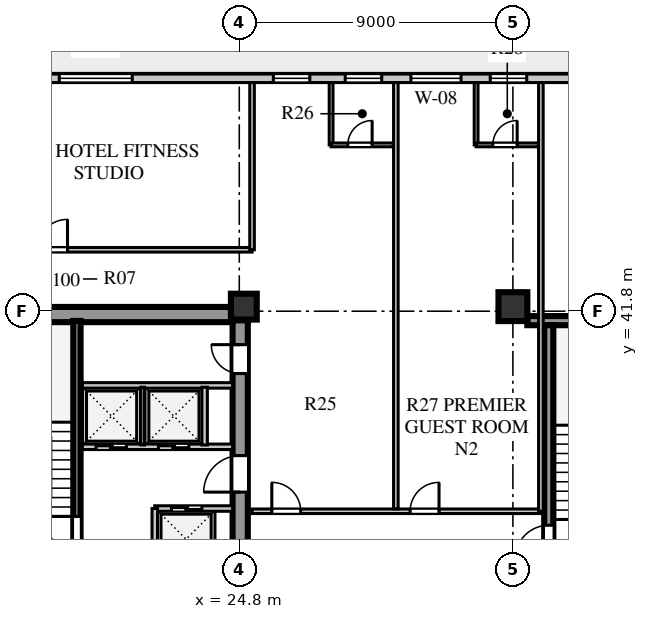
"""IFC4 building model, lengths in metres.
Left out: names, types, materials, properties, quantities, classifications, styles, units other than length and angle.
Written with IfcOpenShell. Run it as: python <this file> out.ifc"""

import sys

from ifc_helpers import new_model, si_unit, direction, frame, frame_2d, origin, origin_2d, place, context, subcontext, project, spatial, rectangle, extrude, element, fill, save


model = new_model("IFC4")
c1 = context("Model", 3, precision=1e-05, world=origin(), true_north=direction((0.0, 1.0)))
c2 = subcontext(c1, "Body", "Model", "MODEL_VIEW")
j1 = project(units=[si_unit("LENGTHUNIT", "METRE"), si_unit("PLANEANGLEUNIT", "RADIAN")], contexts=[c1])
p1 = place(None, origin())
s1 = spatial("IfcSite", under=j1, at=p1, CompositionType="ELEMENT")
p2 = place(p1, origin())
s2 = spatial("IfcBuilding", under=s1, at=p2, CompositionType="ELEMENT")
p3 = place(p2, frame((0.0, 0.0, 196.4)))
s3 = spatial("IfcBuildingStorey", under=s2, at=p3, CompositionType="ELEMENT", Elevation=196.4)
p4 = place(p3, frame((15.4, 41.69, 0.0), z_axis=(0.0, 0.0, 1.0), x_axis=(1.0, 0.0, 0.0)))
e1 = element("IfcWall", 1, at=p4, inside=s3, PredefinedType="SHEAR", context=c2, shape_type="SweptSolid", body=[
    extrude(rectangle(XDim=9.68, YDim=0.5, at=frame_2d((4.84, 0.0))), origin(), (0.0, 0.0, 1.0), 3.6),
])
p5 = place(p3, frame((24.83, 15.74, 0.0), z_axis=(0.0, 0.0, 1.0), x_axis=(0.0, 1.0, 0.0)))
e2 = element("IfcWall", 2, at=p5, inside=s3, PredefinedType="SHEAR", context=c2, shape_type="SweptSolid", body=[
    extrude(rectangle(XDim=25.76, YDim=0.5, at=frame_2d((12.88, 0.0))), origin(), (0.0, 0.0, 1.0), 3.6),
])
p6 = place(p5, frame((1.61, 0.0, 0.0)))
e3 = element("IfcOpeningElement", 3, at=p6, cuts=e2, PredefinedType="OPENING", context=c2, shape_type="SweptSolid", body=[
    extrude(rectangle(XDim=1.2, YDim=2.1, at=frame_2d((0.6, 1.05))), frame((0.0, 0.26, 0.0), z_axis=(0.0, -1.0, 0.0), x_axis=(1.0, 0.0, 0.0)), (0.0, 0.0, 1.0), 0.52),
])
p7 = place(p5, frame((6.78, 0.0, 0.0)))
e4 = element("IfcOpeningElement", 4, at=p7, cuts=e2, PredefinedType="OPENING", context=c2, shape_type="SweptSolid", body=[
    extrude(rectangle(XDim=0.85, YDim=2.06, at=frame_2d((0.425, 1.03))), frame((0.0, 0.26, 0.0), z_axis=(0.0, -1.0, 0.0), x_axis=(1.0, 0.0, 0.0)), (0.0, 0.0, 1.0), 0.52),
])
p8 = place(p5, frame((12.11, 0.0, 0.0)))
e5 = element("IfcOpeningElement", 5, at=p8, cuts=e2, PredefinedType="OPENING", context=c2, shape_type="SweptSolid", body=[
    extrude(rectangle(XDim=1.5, YDim=2.12, at=frame_2d((0.75, 1.06))), frame((0.0, 0.26, 0.0), z_axis=(0.0, -1.0, 0.0), x_axis=(1.0, 0.0, 0.0)), (0.0, 0.0, 1.0), 0.52),
])
p9 = place(p5, frame((20.11, 0.0, 0.0)))
e6 = element("IfcOpeningElement", 6, at=p9, cuts=e2, PredefinedType="OPENING", context=c2, shape_type="SweptSolid", body=[
    extrude(rectangle(XDim=1.2, YDim=2.12, at=frame_2d((0.6, 1.06))), frame((0.0, 0.26, 0.0), z_axis=(0.0, -1.0, 0.0), x_axis=(1.0, 0.0, 0.0)), (0.0, 0.0, 1.0), 0.52),
])
p10 = place(p5, frame((24.01, 0.0, 0.0)))
e7 = element("IfcOpeningElement", 7, at=p10, cuts=e2, PredefinedType="OPENING", context=c2, shape_type="SweptSolid", body=[
    extrude(rectangle(XDim=0.95, YDim=2.1, at=frame_2d((0.475, 1.05))), frame((0.0, 0.26, 0.0), z_axis=(0.0, -1.0, 0.0), x_axis=(1.0, 0.0, 0.0)), (0.0, 0.0, 1.0), 0.52),
])
p11 = place(p3, frame((34.275, 41.49, 0.0), z_axis=(0.0, 0.0, 1.0), x_axis=(1.0, 0.0, 0.0)))
e8 = element("IfcWall", 8, at=p11, inside=s3, PredefinedType="SHEAR", context=c2, shape_type="SweptSolid", body=[
    extrude(rectangle(XDim=4.595, YDim=0.3, at=frame_2d((2.298, 0.0))), origin(), (0.0, 0.0, 1.0), 3.6),
])
p12 = place(p3, frame((34.98, 33.31, 0.0), z_axis=(0.0, 0.0, 1.0), x_axis=(0.0, 1.0, 0.0)))
e9 = element("IfcWall", 9, at=p12, inside=s3, PredefinedType="SHEAR", context=c2, shape_type="SweptSolid", body=[
    extrude(rectangle(XDim=8.03, YDim=0.3, at=frame_2d((4.015, 0.0))), origin(), (0.0, 0.0, 1.0), 3.6),
])
p13 = place(p12, frame((0.35, 0.0, 0.0)))
e10 = element("IfcOpeningElement", 10, at=p13, cuts=e9, PredefinedType="OPENING", context=c2, shape_type="SweptSolid", body=[
    extrude(rectangle(XDim=1.1, YDim=2.1, at=frame_2d((0.55, 1.05))), frame((0.0, 0.16, 0.0), z_axis=(0.0, -1.0, 0.0), x_axis=(1.0, 0.0, 0.0)), (0.0, 0.0, 1.0), 0.32),
])
p14 = place(p3, frame((24.95, 41.95, 0.0), z_axis=(0.0, 0.0, 1.0), x_axis=(1.0, 0.0, 0.0)))
e11 = element("IfcColumn", 11, at=p14, inside=s3, PredefinedType="COLUMN", context=c2, shape_type="SweptSolid", body=[
    extrude(rectangle(XDim=0.85, YDim=0.85, at=origin_2d()), origin(), (0.0, 0.0, 1.0), 3.6),
])
p15 = place(p3, frame((33.8, 41.95, 0.0), z_axis=(0.0, 0.0, 1.0), x_axis=(1.0, 0.0, 0.0)))
e12 = element("IfcColumn", 12, at=p15, inside=s3, PredefinedType="COLUMN", context=c2, shape_type="SweptSolid", body=[
    extrude(rectangle(XDim=0.95, YDim=0.95, at=origin_2d()), origin(), (0.0, 0.0, 1.0), 3.6),
])
p16 = place(p3, frame((45.55, 49.46, 0.0), z_axis=(0.0, 0.0, 1.0), x_axis=(-1.0, 0.0, 0.0)))
e13 = element("IfcWall", 13, at=p16, inside=s3, PredefinedType="STANDARD", context=c2, shape_type="SweptSolid", body=[
    extrude(rectangle(XDim=32.5, YDim=0.28, at=frame_2d((16.25, 0.0))), origin(), (0.0, 0.0, 1.0), 3.6),
])
p17 = place(p16, frame((30.55, 0.0, 0.0)))
e14 = element("IfcOpeningElement", 14, at=p17, cuts=e13, PredefinedType="OPENING", context=c2, shape_type="SweptSolid", body=[
    extrude(rectangle(XDim=1.0, YDim=2.05, at=frame_2d((0.5, 1.025))), frame((0.0, 0.15, 0.0), z_axis=(0.0, -1.0, 0.0), x_axis=(1.0, 0.0, 0.0)), (0.0, 0.0, 1.0), 0.3),
])
p18 = place(p16, frame((24.27, 0.0, 0.8)))
e15 = element("IfcOpeningElement", 15, at=p18, cuts=e13, PredefinedType="OPENING", context=c2, shape_type="SweptSolid", body=[
    extrude(rectangle(XDim=2.4, YDim=2.05, at=frame_2d((1.2, 1.025))), frame((0.0, 0.15, 0.0), z_axis=(0.0, -1.0, 0.0), x_axis=(1.0, 0.0, 0.0)), (0.0, 0.0, 1.0), 0.3),
])
p19 = place(p16, frame((18.43, 0.0, 0.8)))
e16 = element("IfcOpeningElement", 16, at=p19, cuts=e13, PredefinedType="OPENING", context=c2, shape_type="SweptSolid", body=[
    extrude(rectangle(XDim=1.2, YDim=1.75, at=frame_2d((0.6, 0.875))), frame((0.0, 0.15, 0.0), z_axis=(0.0, -1.0, 0.0), x_axis=(1.0, 0.0, 0.0)), (0.0, 0.0, 1.0), 0.3),
])
p20 = place(p16, frame((16.065, 0.0, 0.8)))
e17 = element("IfcOpeningElement", 17, at=p20, cuts=e13, PredefinedType="OPENING", context=c2, shape_type="SweptSolid", body=[
    extrude(rectangle(XDim=1.2, YDim=1.75, at=frame_2d((0.6, 0.875))), frame((0.0, 0.15, 0.0), z_axis=(0.0, -1.0, 0.0), x_axis=(1.0, 0.0, 0.0)), (0.0, 0.0, 1.0), 0.3),
])
p21 = place(p16, frame((13.455, 0.0, 0.8)))
e18 = element("IfcOpeningElement", 18, at=p21, cuts=e13, PredefinedType="OPENING", context=c2, shape_type="SweptSolid", body=[
    extrude(rectangle(XDim=1.65, YDim=1.95, at=frame_2d((0.825, 0.975))), frame((0.0, 0.15, 0.0), z_axis=(0.0, -1.0, 0.0), x_axis=(1.0, 0.0, 0.0)), (0.0, 0.0, 1.0), 0.3),
])
p22 = place(p16, frame((11.295, 0.0, 0.8)))
e19 = element("IfcOpeningElement", 19, at=p22, cuts=e13, PredefinedType="OPENING", context=c2, shape_type="SweptSolid", body=[
    extrude(rectangle(XDim=1.2, YDim=1.75, at=frame_2d((0.6, 0.875))), frame((0.0, 0.15, 0.0), z_axis=(0.0, -1.0, 0.0), x_axis=(1.0, 0.0, 0.0)), (0.0, 0.0, 1.0), 0.3),
])
p23 = place(p16, frame((6.655, 0.0, 0.8)))
e20 = element("IfcOpeningElement", 20, at=p23, cuts=e13, PredefinedType="OPENING", context=c2, shape_type="SweptSolid", body=[
    extrude(rectangle(XDim=2.25, YDim=2.0, at=frame_2d((1.125, 1.0))), frame((0.0, 0.15, 0.0), z_axis=(0.0, -1.0, 0.0), x_axis=(1.0, 0.0, 0.0)), (0.0, 0.0, 1.0), 0.3),
])
p24 = place(p16, frame((1.52, 0.0, 0.8)))
e21 = element("IfcOpeningElement", 21, at=p24, cuts=e13, PredefinedType="OPENING", context=c2, shape_type="SweptSolid", body=[
    extrude(rectangle(XDim=1.8, YDim=2.0, at=frame_2d((0.9, 1.0))), frame((0.0, 0.15, 0.0), z_axis=(0.0, -1.0, 0.0), x_axis=(1.0, 0.0, 0.0)), (0.0, 0.0, 1.0), 0.3),
])
p25 = place(p3, frame((19.46, 33.3, 0.0), z_axis=(0.0, 0.0, 1.0), x_axis=(0.0, 1.0, 0.0)))
e22 = element("IfcWall", 22, at=p25, inside=s3, PredefinedType="SHEAR", context=c2, shape_type="SweptSolid", body=[
    extrude(rectangle(XDim=8.18, YDim=0.24, at=frame_2d((4.09, 0.0))), origin(), (0.0, 0.0, 1.0), 3.85),
])
p26 = place(p25, frame((0.65, 0.0, 0.0)))
e23 = element("IfcOpeningElement", 23, at=p26, cuts=e22, PredefinedType="OPENING", context=c2, shape_type="SweptSolid", body=[
    extrude(rectangle(XDim=1.1, YDim=2.1, at=frame_2d((0.55, 1.05))), frame((0.0, 0.13, 0.0), z_axis=(0.0, -1.0, 0.0), x_axis=(1.0, 0.0, 0.0)), (0.0, 0.0, 1.0), 0.26),
])
p27 = place(p3, frame((22.02, 35.31, 0.0), z_axis=(0.0, 0.0, 1.0), x_axis=(1.0, 0.0, 0.0)))
e24 = element("IfcWall", 24, at=p27, inside=s3, PredefinedType="SOLIDWALL", context=c2, shape_type="SweptSolid", body=[
    extrude(rectangle(XDim=2.56, YDim=0.18, at=frame_2d((1.28, 0.0))), origin(), (0.0, 0.0, 1.0), 3.6),
])
p28 = place(p27, frame((0.55, 0.0, 0.0)))
e25 = element("IfcOpeningElement", 25, at=p28, cuts=e24, PredefinedType="OPENING", context=c2, shape_type="SweptSolid", body=[
    extrude(rectangle(XDim=1.0, YDim=2.1, at=frame_2d((0.5, 1.05))), frame((0.0, 0.1, 0.0), z_axis=(0.0, -1.0, 0.0), x_axis=(1.0, 0.0, 0.0)), (0.0, 0.0, 1.0), 0.2),
])
p29 = place(p3, frame((22.02, 33.3, 0.0), z_axis=(0.0, 0.0, 1.0), x_axis=(0.0, 1.0, 0.0)))
e26 = element("IfcWall", 26, at=p29, inside=s3, PredefinedType="SOLIDWALL", context=c2, shape_type="SweptSolid", body=[
    extrude(rectangle(XDim=2.01, YDim=0.18, at=frame_2d((1.005, 0.0))), origin(), (0.0, 0.0, 1.0), 3.6),
])
p30 = place(p3, frame((19.64, 37.34, 0.0), z_axis=(0.0, 0.0, 1.0), x_axis=(1.0, 0.0, 0.0)))
e27 = element("IfcWall", 27, at=p30, inside=s3, PredefinedType="SOLIDWALL", context=c2, shape_type="SweptSolid", body=[
    extrude(rectangle(XDim=4.94, YDim=0.18, at=frame_2d((2.47, 0.0))), origin(), (0.0, 0.0, 1.0), 3.6),
])
p31 = place(p30, frame((0.45, 0.0, 0.0)))
e28 = element("IfcOpeningElement", 28, at=p31, cuts=e27, PredefinedType="OPENING", context=c2, shape_type="SweptSolid", body=[
    extrude(rectangle(XDim=1.0, YDim=2.1, at=frame_2d((0.5, 1.05))), frame((0.0, 0.1, 0.0), z_axis=(0.0, -1.0, 0.0), x_axis=(1.0, 0.0, 0.0)), (0.0, 0.0, 1.0), 0.2),
])
p32 = place(p30, frame((2.5, 0.0, 0.0)))
e29 = element("IfcOpeningElement", 29, at=p32, cuts=e27, PredefinedType="OPENING", context=c2, shape_type="SweptSolid", body=[
    extrude(rectangle(XDim=1.0, YDim=2.1, at=frame_2d((0.5, 1.05))), frame((0.0, 0.1, 0.0), z_axis=(0.0, -1.0, 0.0), x_axis=(1.0, 0.0, 0.0)), (0.0, 0.0, 1.0), 0.2),
])
p33 = place(p3, frame((19.64, 39.36, 0.0), z_axis=(0.0, 0.0, 1.0), x_axis=(1.0, 0.0, 0.0)))
e30 = element("IfcWall", 30, at=p33, inside=s3, PredefinedType="SOLIDWALL", context=c2, shape_type="SweptSolid", body=[
    extrude(rectangle(XDim=4.94, YDim=0.18, at=frame_2d((2.47, 0.0))), origin(), (0.0, 0.0, 1.0), 3.6),
])
p34 = place(p3, frame((21.62, 37.4, 0.0), z_axis=(0.0, 0.0, 1.0), x_axis=(0.0, 1.0, 0.0)))
e31 = element("IfcWall", 31, at=p34, inside=s3, PredefinedType="PARTITIONING", context=c2, shape_type="SweptSolid", body=[
    extrude(rectangle(XDim=1.9, YDim=0.12, at=frame_2d((0.95, 0.0))), origin(), (0.0, 0.0, 1.0), 3.6),
])
p35 = place(p3, frame((23.66, 37.4, 0.0), z_axis=(0.0, 0.0, 1.0), x_axis=(0.0, 1.0, 0.0)))
e32 = element("IfcWall", 32, at=p35, inside=s3, PredefinedType="SOLIDWALL", context=c2, shape_type="SweptSolid", body=[
    extrude(rectangle(XDim=1.9, YDim=0.18, at=frame_2d((0.95, 0.0))), origin(), (0.0, 0.0, 1.0), 3.6),
])
p36 = place(p3, frame((25.22, 35.22, 0.0), z_axis=(0.0, 0.0, 1.0), x_axis=(1.0, 0.0, 0.0)))
e33 = element("IfcWall", 33, at=p36, inside=s3, PredefinedType="PARTITIONING", context=c2, shape_type="SweptSolid", body=[
    extrude(rectangle(XDim=9.5, YDim=0.15, at=frame_2d((4.75, 0.0))), origin(), (0.0, 0.0, 1.0), 3.6),
])
p37 = place(p36, frame((0.65, 0.0, 0.0)))
e34 = element("IfcOpeningElement", 34, at=p37, cuts=e33, PredefinedType="OPENING", context=c2, shape_type="SweptSolid", body=[
    extrude(rectangle(XDim=0.95, YDim=2.1, at=frame_2d((0.475, 1.05))), frame((0.0, 0.085, 0.0), z_axis=(0.0, -1.0, 0.0), x_axis=(1.0, 0.0, 0.0)), (0.0, 0.0, 1.0), 0.17),
])
p38 = place(p36, frame((5.2, 0.0, 0.0)))
e35 = element("IfcOpeningElement", 35, at=p38, cuts=e33, PredefinedType="OPENING", context=c2, shape_type="SweptSolid", body=[
    extrude(rectangle(XDim=0.95, YDim=2.1, at=frame_2d((0.475, 1.05))), frame((0.0, 0.085, 0.0), z_axis=(0.0, -1.0, 0.0), x_axis=(1.0, 0.0, 0.0)), (0.0, 0.0, 1.0), 0.17),
])
p39 = place(p3, frame((13.39, 43.82, 0.0), z_axis=(0.0, 0.0, 1.0), x_axis=(1.0, 0.0, 0.0)))
e36 = element("IfcWall", 36, at=p39, inside=s3, PredefinedType="PARTITIONING", context=c2, shape_type="SweptSolid", body=[
    extrude(rectangle(XDim=11.83, YDim=0.15, at=frame_2d((5.915, 0.0))), origin(), (0.0, 0.0, 1.0), 3.6),
])
p40 = place(p39, frame((4.76, 0.0, 0.0)))
e37 = element("IfcOpeningElement", 37, at=p40, cuts=e36, PredefinedType="OPENING", context=c2, shape_type="SweptSolid", body=[
    extrude(rectangle(XDim=1.0, YDim=2.08, at=frame_2d((0.5, 1.04))), frame((0.0, 0.085, 0.0), z_axis=(0.0, -1.0, 0.0), x_axis=(1.0, 0.0, 0.0)), (0.0, 0.0, 1.0), 0.17),
])
p41 = place(p3, frame((25.22, 43.82, 0.0), z_axis=(0.0, 0.0, 1.0), x_axis=(0.0, 1.0, 0.0)))
e38 = element("IfcWall", 38, at=p41, inside=s3, PredefinedType="PARTITIONING", context=c2, shape_type="SweptSolid", body=[
    extrude(rectangle(XDim=5.5, YDim=0.15, at=frame_2d((2.75, 0.0))), origin(), (0.0, 0.0, 1.0), 3.15),
])
p42 = place(p3, frame((34.72, 35.22, 0.0), z_axis=(0.0, 0.0, 1.0), x_axis=(0.0, 1.0, 0.0)))
e39 = element("IfcWall", 39, at=p42, inside=s3, PredefinedType="PARTITIONING", context=c2, shape_type="SweptSolid", body=[
    extrude(rectangle(XDim=14.1, YDim=0.15, at=frame_2d((7.05, 0.0))), origin(), (0.0, 0.0, 1.0), 3.6),
])
p43 = place(p3, frame((29.95, 35.3, 0.0), z_axis=(0.0, 0.0, 1.0), x_axis=(0.0, 1.0, 0.0)))
e40 = element("IfcWall", 40, at=p43, inside=s3, PredefinedType="PARTITIONING", context=c2, shape_type="SweptSolid", body=[
    extrude(rectangle(XDim=14.02, YDim=0.15, at=frame_2d((7.01, 0.0))), origin(), (0.0, 0.0, 1.0), 3.6),
])
p44 = place(p3, frame((27.82, 47.27, 0.0), z_axis=(0.0, 0.0, 1.0), x_axis=(0.0, 1.0, 0.0)))
e41 = element("IfcWall", 41, at=p44, inside=s3, PredefinedType="PLUMBINGWALL", context=c2, shape_type="SweptSolid", body=[
    extrude(rectangle(XDim=2.05, YDim=0.125, at=frame_2d((1.025, 0.0))), origin(), (0.0, 0.0, 1.0), 3.6),
])
p45 = place(p3, frame((27.82, 47.27, 0.0), z_axis=(0.0, 0.0, 1.0), x_axis=(1.0, 0.0, 0.0)))
e42 = element("IfcWall", 42, at=p45, inside=s3, PredefinedType="PLUMBINGWALL", context=c2, shape_type="SweptSolid", body=[
    extrude(rectangle(XDim=2.05, YDim=0.125, at=frame_2d((1.025, 0.0))), origin(), (0.0, 0.0, 1.0), 3.6),
])
p46 = place(p45, frame((0.55, 0.0, 0.0)))
e43 = element("IfcOpeningElement", 43, at=p46, cuts=e42, PredefinedType="OPENING", context=c2, shape_type="SweptSolid", body=[
    extrude(rectangle(XDim=0.8, YDim=2.05, at=frame_2d((0.4, 1.025))), frame((0.0, 0.073, 0.0), z_axis=(0.0, -1.0, 0.0), x_axis=(1.0, 0.0, 0.0)), (0.0, 0.0, 1.0), 0.145),
])
p47 = place(p3, frame((32.59, 47.27, 0.0), z_axis=(0.0, 0.0, 1.0), x_axis=(0.0, 1.0, 0.0)))
e44 = element("IfcWall", 44, at=p47, inside=s3, PredefinedType="PLUMBINGWALL", context=c2, shape_type="SweptSolid", body=[
    extrude(rectangle(XDim=2.05, YDim=0.125, at=frame_2d((1.025, 0.0))), origin(), (0.0, 0.0, 1.0), 3.6),
])
p48 = place(p3, frame((32.59, 47.27, 0.0), z_axis=(0.0, 0.0, 1.0), x_axis=(1.0, 0.0, 0.0)))
e45 = element("IfcWall", 45, at=p48, inside=s3, PredefinedType="PLUMBINGWALL", context=c2, shape_type="SweptSolid", body=[
    extrude(rectangle(XDim=2.05, YDim=0.125, at=frame_2d((1.025, 0.0))), origin(), (0.0, 0.0, 1.0), 3.6),
])
p49 = place(p48, frame((0.55, 0.0, 0.0)))
e46 = element("IfcOpeningElement", 46, at=p49, cuts=e45, PredefinedType="OPENING", context=c2, shape_type="SweptSolid", body=[
    extrude(rectangle(XDim=0.8, YDim=2.05, at=frame_2d((0.4, 1.025))), frame((0.0, 0.073, 0.0), z_axis=(0.0, -1.0, 0.0), x_axis=(1.0, 0.0, 0.0)), (0.0, 0.0, 1.0), 0.145),
])
p50 = place(p18, origin())
e47 = element("IfcWindow", 47, at=p50, inside=s3, PartitioningType="SINGLE_PANEL", PredefinedType="WINDOW", context=c2, shape_type="SweptSolid", body=[
    extrude(rectangle(XDim=2.4, YDim=2.05, at=frame_2d((1.2, 1.025))), frame((0.0, 0.03, 0.0), z_axis=(0.0, -1.0, 0.0), x_axis=(1.0, 0.0, 0.0)), (0.0, 0.0, 1.0), 0.06),
])
fill(e15, e47)
p51 = place(p19, origin())
e48 = element("IfcWindow", 48, at=p51, inside=s3, PartitioningType="SINGLE_PANEL", PredefinedType="WINDOW", context=c2, shape_type="SweptSolid", body=[
    extrude(rectangle(XDim=1.2, YDim=1.75, at=frame_2d((0.6, 0.875))), frame((0.0, 0.03, 0.0), z_axis=(0.0, -1.0, 0.0), x_axis=(1.0, 0.0, 0.0)), (0.0, 0.0, 1.0), 0.06),
])
fill(e16, e48)
p52 = place(p20, origin())
e49 = element("IfcWindow", 49, at=p52, inside=s3, PartitioningType="SINGLE_PANEL", PredefinedType="WINDOW", context=c2, shape_type="SweptSolid", body=[
    extrude(rectangle(XDim=1.2, YDim=1.75, at=frame_2d((0.6, 0.875))), frame((0.0, 0.03, 0.0), z_axis=(0.0, -1.0, 0.0), x_axis=(1.0, 0.0, 0.0)), (0.0, 0.0, 1.0), 0.06),
])
fill(e17, e49)
p53 = place(p21, origin())
e50 = element("IfcWindow", 50, at=p53, inside=s3, PartitioningType="SINGLE_PANEL", PredefinedType="WINDOW", context=c2, shape_type="SweptSolid", body=[
    extrude(rectangle(XDim=1.65, YDim=1.95, at=frame_2d((0.825, 0.975))), frame((0.0, 0.03, 0.0), z_axis=(0.0, -1.0, 0.0), x_axis=(1.0, 0.0, 0.0)), (0.0, 0.0, 1.0), 0.06),
])
fill(e18, e50)
p54 = place(p22, origin())
e51 = element("IfcWindow", 51, at=p54, inside=s3, PartitioningType="SINGLE_PANEL", PredefinedType="WINDOW", context=c2, shape_type="SweptSolid", body=[
    extrude(rectangle(XDim=1.2, YDim=1.75, at=frame_2d((0.6, 0.875))), frame((0.0, 0.03, 0.0), z_axis=(0.0, -1.0, 0.0), x_axis=(1.0, 0.0, 0.0)), (0.0, 0.0, 1.0), 0.06),
])
fill(e19, e51)
p55 = place(p26, origin())
e52 = element("IfcDoor", 52, at=p55, inside=s3, OperationType="SINGLE_SWING_RIGHT", PredefinedType="DOOR", context=c2, shape_type="SweptSolid", body=[
    extrude(rectangle(XDim=1.1, YDim=2.1, at=frame_2d((0.55, 1.05))), frame((0.0, 0.025, 0.0), z_axis=(0.0, -1.0, 0.0), x_axis=(1.0, 0.0, 0.0)), (0.0, 0.0, 1.0), 0.05),
])
fill(e23, e52)
p56 = place(p9, frame((1.2, 0.0, 0.0), z_axis=(0.0, 0.0, 1.0), x_axis=(-1.0, 0.0, 0.0)))
e53 = element("IfcDoor", 53, at=p56, inside=s3, OperationType="SINGLE_SWING_RIGHT", PredefinedType="DOOR", context=c2, shape_type="SweptSolid", body=[
    extrude(rectangle(XDim=1.2, YDim=2.12, at=frame_2d((0.6, 1.06))), frame((0.0, 0.025, 0.0), z_axis=(0.0, -1.0, 0.0), x_axis=(1.0, 0.0, 0.0)), (0.0, 0.0, 1.0), 0.05),
])
fill(e6, e53)
p57 = place(p31, frame((1.0, 0.0, 0.0), z_axis=(0.0, 0.0, 1.0), x_axis=(-1.0, 0.0, 0.0)))
e54 = element("IfcDoor", 54, at=p57, inside=s3, OperationType="DOUBLE_DOOR_SLIDING", PredefinedType="DOOR", context=c2, shape_type="SweptSolid", body=[
    extrude(rectangle(XDim=1.0, YDim=2.1, at=frame_2d((0.5, 1.05))), frame((0.0, 0.025, 0.0), z_axis=(0.0, -1.0, 0.0), x_axis=(1.0, 0.0, 0.0)), (0.0, 0.0, 1.0), 0.05),
])
fill(e28, e54)
p58 = place(p32, frame((1.0, 0.0, 0.0), z_axis=(0.0, 0.0, 1.0), x_axis=(-1.0, 0.0, 0.0)))
e55 = element("IfcDoor", 55, at=p58, inside=s3, OperationType="DOUBLE_DOOR_SLIDING", PredefinedType="DOOR", context=c2, shape_type="SweptSolid", body=[
    extrude(rectangle(XDim=1.0, YDim=2.1, at=frame_2d((0.5, 1.05))), frame((0.0, 0.025, 0.0), z_axis=(0.0, -1.0, 0.0), x_axis=(1.0, 0.0, 0.0)), (0.0, 0.0, 1.0), 0.05),
])
fill(e29, e55)
p59 = place(p28, origin())
e56 = element("IfcDoor", 56, at=p59, inside=s3, OperationType="DOUBLE_DOOR_SLIDING", PredefinedType="DOOR", context=c2, shape_type="SweptSolid", body=[
    extrude(rectangle(XDim=1.0, YDim=2.1, at=frame_2d((0.5, 1.05))), frame((0.0, 0.025, 0.0), z_axis=(0.0, -1.0, 0.0), x_axis=(1.0, 0.0, 0.0)), (0.0, 0.0, 1.0), 0.05),
])
fill(e25, e56)
p60 = place(p10, frame((0.95, 0.0, 0.0), z_axis=(0.0, 0.0, 1.0), x_axis=(-1.0, 0.0, 0.0)))
e57 = element("IfcDoor", 57, at=p60, inside=s3, OperationType="SINGLE_SWING_LEFT", PredefinedType="DOOR", context=c2, shape_type="SweptSolid", body=[
    extrude(rectangle(XDim=0.95, YDim=2.1, at=frame_2d((0.475, 1.05))), frame((0.0, 0.025, 0.0), z_axis=(0.0, -1.0, 0.0), x_axis=(1.0, 0.0, 0.0)), (0.0, 0.0, 1.0), 0.05),
])
fill(e7, e57)
p61 = place(p13, origin())
e58 = element("IfcDoor", 58, at=p61, inside=s3, OperationType="SINGLE_SWING_LEFT", PredefinedType="DOOR", context=c2, shape_type="SweptSolid", body=[
    extrude(rectangle(XDim=1.1, YDim=2.1, at=frame_2d((0.55, 1.05))), frame((0.0, 0.025, 0.0), z_axis=(0.0, -1.0, 0.0), x_axis=(1.0, 0.0, 0.0)), (0.0, 0.0, 1.0), 0.05),
])
fill(e10, e58)
p62 = place(p40, origin())
e59 = element("IfcDoor", 59, at=p62, inside=s3, OperationType="SINGLE_SWING_RIGHT", PredefinedType="DOOR", context=c2, shape_type="SweptSolid", body=[
    extrude(rectangle(XDim=1.0, YDim=2.08, at=frame_2d((0.5, 1.04))), frame((0.0, 0.025, 0.0), z_axis=(0.0, -1.0, 0.0), x_axis=(1.0, 0.0, 0.0)), (0.0, 0.0, 1.0), 0.05),
])
fill(e37, e59)
p63 = place(p37, origin())
e60 = element("IfcDoor", 60, at=p63, inside=s3, OperationType="SINGLE_SWING_LEFT", PredefinedType="DOOR", context=c2, shape_type="SweptSolid", body=[
    extrude(rectangle(XDim=0.95, YDim=2.1, at=frame_2d((0.475, 1.05))), frame((0.0, 0.025, 0.0), z_axis=(0.0, -1.0, 0.0), x_axis=(1.0, 0.0, 0.0)), (0.0, 0.0, 1.0), 0.05),
])
fill(e34, e60)
p64 = place(p46, frame((0.8, 0.0, 0.0), z_axis=(0.0, 0.0, 1.0), x_axis=(-1.0, 0.0, 0.0)))
e61 = element("IfcDoor", 61, at=p64, inside=s3, OperationType="SINGLE_SWING_LEFT", PredefinedType="DOOR", context=c2, shape_type="SweptSolid", body=[
    extrude(rectangle(XDim=0.8, YDim=2.05, at=frame_2d((0.4, 1.025))), frame((0.0, 0.025, 0.0), z_axis=(0.0, -1.0, 0.0), x_axis=(1.0, 0.0, 0.0)), (0.0, 0.0, 1.0), 0.05),
])
fill(e43, e61)
p65 = place(p38, origin())
e62 = element("IfcDoor", 62, at=p65, inside=s3, OperationType="SINGLE_SWING_RIGHT", PredefinedType="DOOR", context=c2, shape_type="SweptSolid", body=[
    extrude(rectangle(XDim=0.95, YDim=2.1, at=frame_2d((0.475, 1.05))), frame((0.0, 0.025, 0.0), z_axis=(0.0, -1.0, 0.0), x_axis=(1.0, 0.0, 0.0)), (0.0, 0.0, 1.0), 0.05),
])
fill(e35, e62)
p66 = place(p49, frame((0.8, 0.0, 0.0), z_axis=(0.0, 0.0, 1.0), x_axis=(-1.0, 0.0, 0.0)))
e63 = element("IfcDoor", 63, at=p66, inside=s3, OperationType="SINGLE_SWING_LEFT", PredefinedType="DOOR", context=c2, shape_type="SweptSolid", body=[
    extrude(rectangle(XDim=0.8, YDim=2.05, at=frame_2d((0.4, 1.025))), frame((0.0, 0.025, 0.0), z_axis=(0.0, -1.0, 0.0), x_axis=(1.0, 0.0, 0.0)), (0.0, 0.0, 1.0), 0.05),
])
fill(e46, e63)
save(model, sys.argv[1])
